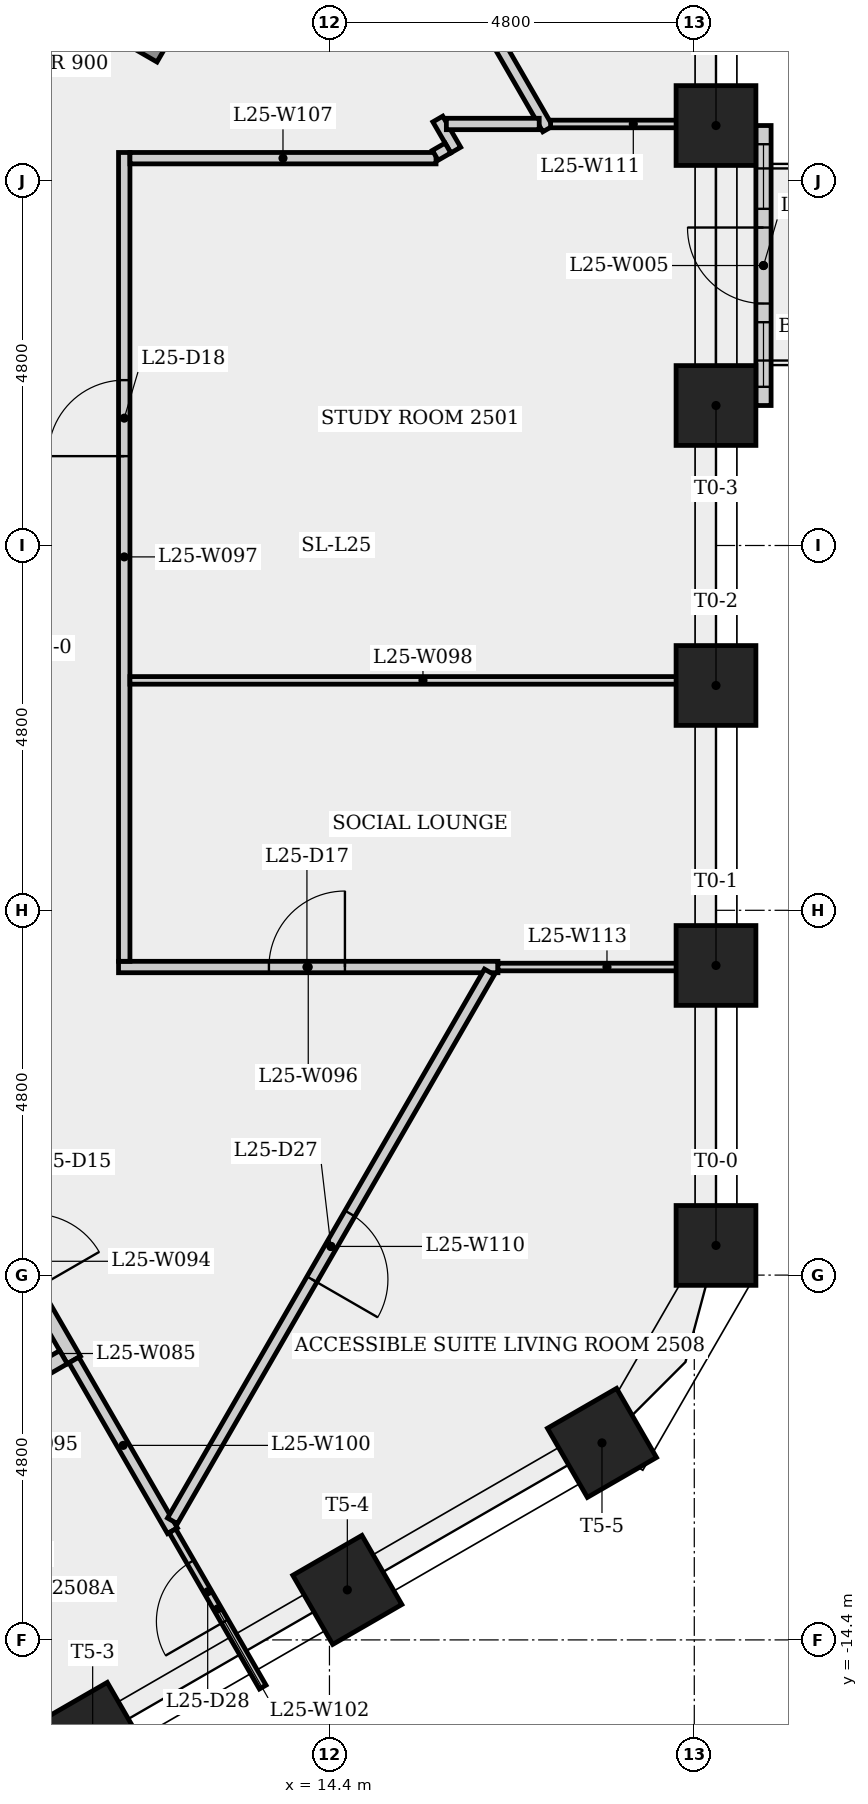
"""IFC4 building model, lengths in metres.
Left out: names, types, materials, properties, quantities, classifications, styles, units other than length and angle.
Written with IfcOpenShell. Run it as: python <this file> out.ifc"""

import sys

from ifc_helpers import new_model, si_unit, direction, frame, frame_2d, origin, origin_2d, place, context, subcontext, project, spatial, rectangle, extrude, element, fill, save


model = new_model("IFC4")
c1 = context("Model", 3, precision=1e-05, world=origin(), true_north=direction((0.0, 1.0)))
c2 = subcontext(c1, "Body", "Model", "MODEL_VIEW")
j1 = project(units=[si_unit("LENGTHUNIT", "METRE"), si_unit("PLANEANGLEUNIT", "RADIAN")], contexts=[c1])
p1 = place(None, origin())
s1 = spatial("IfcSite", under=j1, at=p1, CompositionType="ELEMENT")
p2 = place(p1, origin())
s2 = spatial("IfcBuilding", under=s1, at=p2, CompositionType="ELEMENT")
p3 = place(p2, frame((0.0, 0.0, 96.7)))
s3 = spatial("IfcBuildingStorey", under=s2, at=p3, CompositionType="ELEMENT", Elevation=96.7)
for number, where, z_axis, x_axis in (
    (1, (19.486, -9.209, 0.0), (0.0, 0.0, 1.0), (1.0, 0.0, 0.0)),
    (2, (19.486, -5.526, 0.0), (0.0, 0.0, 1.0), (1.0, 0.0, 0.0)),
    (3, (19.486, -1.842, 0.0), (0.0, 0.0, 1.0), (1.0, 0.0, 0.0)),
    (4, (19.486, 1.842, 0.0), (0.0, 0.0, 1.0), (1.0, 0.0, 0.0)),
    (5, (19.486, 5.526, 0.0), (0.0, 0.0, 1.0), (1.0, 0.0, 0.0)),
    (6, (11.284, -15.677, 0.0), (0.0, 0.0, 1.0), (0.5, -0.866, 0.0)),
    (7, (14.635, -13.742, 0.0), (0.0, 0.0, 1.0), (0.5, -0.866, 0.0)),
    (8, (17.986, -11.808, 0.0), (0.0, 0.0, 1.0), (0.5, -0.866, 0.0)),
):
    element("IfcColumn", number, at=place(p3, frame(where, z_axis=z_axis, x_axis=x_axis)), inside=s3, PredefinedType="COLUMN", context=c2, shape_type="SweptSolid", body=[
        extrude(rectangle(XDim=1.05, YDim=1.05, at=origin_2d()), origin(), (0.0, 0.0, 1.0), 3.4),
    ])
p4 = place(p3, frame((20.111, 1.842, 0.0), z_axis=(0.0, 0.0, 1.0), x_axis=(0.0, 1.0, 0.0)))
e9 = element("IfcWall", 9, at=p4, inside=s3, PredefinedType="SOLIDWALL", context=c2, shape_type="SweptSolid", body=[
    extrude(rectangle(XDim=3.684, YDim=0.2, at=frame_2d((1.842, 0.0))), origin(), (0.0, 0.0, 1.0), 3.4),
])
p5 = place(p4, frame((1.342, 0.0, 0.0)))
e10 = element("IfcOpeningElement", 10, at=p5, cuts=e9, PredefinedType="OPENING", context=c2, shape_type="SweptSolid", body=[
    extrude(rectangle(XDim=1.0, YDim=2.4, at=frame_2d((0.5, 1.2))), frame((0.0, 0.11, 0.0), z_axis=(0.0, -1.0, 0.0), x_axis=(1.0, 0.0, 0.0)), (0.0, 0.0, 1.0), 0.22),
])
p6 = place(p4, frame((0.246, 0.0, 0.9)))
e11 = element("IfcOpeningElement", 11, at=p6, cuts=e9, PredefinedType="OPENING", context=c2, shape_type="SweptSolid", body=[
    extrude(rectangle(XDim=0.85, YDim=1.5, at=frame_2d((0.425, 0.75))), frame((0.0, 0.11, 0.0), z_axis=(0.0, -1.0, 0.0), x_axis=(1.0, 0.0, 0.0)), (0.0, 0.0, 1.0), 0.22),
])
p7 = place(p4, frame((2.588, 0.0, 0.9)))
e12 = element("IfcOpeningElement", 12, at=p7, cuts=e9, PredefinedType="OPENING", context=c2, shape_type="SweptSolid", body=[
    extrude(rectangle(XDim=0.85, YDim=1.5, at=frame_2d((0.425, 0.75))), frame((0.0, 0.11, 0.0), z_axis=(0.0, -1.0, 0.0), x_axis=(1.0, 0.0, 0.0)), (0.0, 0.0, 1.0), 0.22),
])
p8 = place(p3, frame((9.537, -8.119, 0.0), z_axis=(0.0, 0.0, 1.0), x_axis=(0.499990139034, -0.866031096941, 0.0)))
e13 = element("IfcWall", 13, at=p8, inside=s3, PredefinedType="PARTITIONING", context=c2, shape_type="SweptSolid", body=[
    extrude(rectangle(XDim=3.0, YDim=0.2, at=frame_2d((1.5, 0.0))), origin(), (0.0, 0.0, 1.0), 3.05),
])
p9 = place(p8, frame((0.935, 0.0, 0.0)))
e14 = element("IfcOpeningElement", 14, at=p9, cuts=e13, PredefinedType="OPENING", context=c2, shape_type="SweptSolid", body=[
    extrude(rectangle(XDim=1.0, YDim=2.1, at=frame_2d((0.5, 1.05))), frame((0.0, 0.11, 0.0), z_axis=(0.0, -1.0, 0.0), x_axis=(1.0, 0.0, 0.0)), (0.0, 0.0, 1.0), 0.22),
])
p10 = place(p3, frame((10.901, -10.681, 0.0), z_axis=(0.0, 0.0, 1.0), x_axis=(-0.866007538022, -0.500030943131, 0.0)))
e15 = element("IfcWall", 15, at=p10, inside=s3, PredefinedType="PARTITIONING", context=c2, shape_type="SweptSolid", body=[
    extrude(rectangle(XDim=2.375, YDim=0.2, at=frame_2d((1.188, 0.0))), origin(), (0.0, 0.0, 1.0), 3.05),
])
p11 = place(p3, frame((11.625, -5.546, 0.0), z_axis=(0.0, 0.0, 1.0), x_axis=(1.0, 0.0, 0.0)))
e16 = element("IfcWall", 16, at=p11, inside=s3, PredefinedType="PARTITIONING", context=c2, shape_type="SweptSolid", body=[
    extrude(rectangle(XDim=4.992, YDim=0.15, at=frame_2d((2.496, 0.0))), origin(), (0.0, 0.0, 1.0), 3.05),
])
p12 = place(p11, frame((1.979, 0.0, 0.0)))
e17 = element("IfcOpeningElement", 17, at=p12, cuts=e16, PredefinedType="OPENING", context=c2, shape_type="SweptSolid", body=[
    extrude(rectangle(XDim=1.0, YDim=2.1, at=frame_2d((0.5, 1.05))), frame((0.0, 0.085, 0.0), z_axis=(0.0, -1.0, 0.0), x_axis=(1.0, 0.0, 0.0)), (0.0, 0.0, 1.0), 0.17),
])
p13 = place(p3, frame((11.7, -5.471, 0.0), z_axis=(0.0, 0.0, 1.0), x_axis=(0.0, 1.0, 0.0)))
e18 = element("IfcWall", 18, at=p13, inside=s3, PredefinedType="PARTITIONING", context=c2, shape_type="SweptSolid", body=[
    extrude(rectangle(XDim=10.643, YDim=0.15, at=frame_2d((5.321, 0.0))), origin(), (0.0, 0.0, 1.0), 3.05),
])
p14 = place(p13, frame((6.647, 0.0, 0.0)))
e19 = element("IfcOpeningElement", 19, at=p14, cuts=e18, PredefinedType="OPENING", context=c2, shape_type="SweptSolid", body=[
    extrude(rectangle(XDim=1.0, YDim=2.1, at=frame_2d((0.5, 1.05))), frame((0.0, 0.085, 0.0), z_axis=(0.0, -1.0, 0.0), x_axis=(1.0, 0.0, 0.0)), (0.0, 0.0, 1.0), 0.17),
])
p15 = place(p3, frame((11.775, -1.775, 0.0), z_axis=(0.0, 0.0, 1.0), x_axis=(1.0, 0.0, 0.0)))
e20 = element("IfcWall", 20, at=p15, inside=s3, PredefinedType="PARTITIONING", context=c2, shape_type="SweptSolid", body=[
    extrude(rectangle(XDim=7.711, YDim=0.1, at=frame_2d((3.855, 0.0))), origin(), (0.0, 0.0, 1.0), 3.05),
])
p16 = place(p3, frame((12.194, 6.47, 0.0), z_axis=(0.0, 0.0, 1.0), x_axis=(-0.866025499775, 0.499999833739, 0.0)))
e21 = element("IfcWall", 21, at=p16, inside=s3, PredefinedType="SHEAR", context=c2, shape_type="SweptSolid", body=[
    extrude(rectangle(XDim=6.4, YDim=0.25, at=frame_2d((3.2, 0.0))), origin(), (0.0, 0.0, 1.0), 3.05),
])
p17 = place(p16, frame((5.25, 0.0, 0.0)))
e22 = element("IfcOpeningElement", 22, at=p17, cuts=e21, PredefinedType="OPENING", context=c2, shape_type="SweptSolid", body=[
    extrude(rectangle(XDim=1.0, YDim=2.1, at=frame_2d((0.5, 1.05))), frame((0.0, 0.135, 0.0), z_axis=(0.0, -1.0, 0.0), x_axis=(1.0, 0.0, 0.0)), (0.0, 0.0, 1.0), 0.27),
])
p18 = place(p3, frame((12.334, -12.964, 0.0), z_axis=(0.0, 0.0, 1.0), x_axis=(-0.499974977939, 0.866039849796, 0.0)))
e23 = element("IfcWall", 23, at=p18, inside=s3, PredefinedType="PARTITIONING", context=c2, shape_type="SweptSolid", body=[
    extrude(rectangle(XDim=2.594, YDim=0.15, at=frame_2d((1.297, 0.0))), origin(), (0.0, 0.0, 1.0), 3.05),
])
p19 = place(p3, frame((13.522, -15.021, 0.0), z_axis=(0.0, 0.0, 1.0), x_axis=(-0.500030943131, 0.866007538022, 0.0)))
e24 = element("IfcWall", 24, at=p19, inside=s3, PredefinedType="PARTITIONING", context=c2, shape_type="SweptSolid", body=[
    extrude(rectangle(XDim=2.375, YDim=0.1, at=frame_2d((1.188, 0.0))), origin(), (0.0, 0.0, 1.0), 3.05),
])
p20 = place(p19, frame((0.998, 0.0, 0.0)))
e25 = element("IfcOpeningElement", 25, at=p20, cuts=e24, PredefinedType="OPENING", context=c2, shape_type="SweptSolid", body=[
    extrude(rectangle(XDim=0.9, YDim=2.1, at=frame_2d((0.45, 1.05))), frame((0.0, 0.06, 0.0), z_axis=(0.0, -1.0, 0.0), x_axis=(1.0, 0.0, 0.0)), (0.0, 0.0, 1.0), 0.12),
])
p21 = place(p3, frame((14.413, 10.434, 0.0), z_axis=(0.0, 0.0, 1.0), x_axis=(0.49999591573, -0.866027761826, 0.0)))
e26 = element("IfcWall", 26, at=p21, inside=s3, PredefinedType="PARTITIONING", context=c2, shape_type="SweptSolid", body=[
    extrude(rectangle(XDim=5.719, YDim=0.15, at=frame_2d((2.859, 0.0))), origin(), (0.0, 0.0, 1.0), 3.05),
])
p22 = place(p21, frame((2.304, 0.0, 0.0)))
e27 = element("IfcOpeningElement", 27, at=p22, cuts=e26, PredefinedType="OPENING", context=c2, shape_type="SweptSolid", body=[
    extrude(rectangle(XDim=1.0, YDim=2.1, at=frame_2d((0.5, 1.05))), frame((0.0, 0.085, 0.0), z_axis=(0.0, -1.0, 0.0), x_axis=(1.0, 0.0, 0.0)), (0.0, 0.0, 1.0), 0.17),
])
p23 = place(p3, frame((15.802, 5.096, 0.0), z_axis=(0.0, 0.0, 1.0), x_axis=(-1.0, 0.0, 0.0)))
e28 = element("IfcWall", 28, at=p23, inside=s3, PredefinedType="PARTITIONING", context=c2, shape_type="SweptSolid", body=[
    extrude(rectangle(XDim=4.027, YDim=0.15, at=frame_2d((2.014, 0.0))), origin(), (0.0, 0.0, 1.0), 3.05),
])
p24 = place(p3, frame((15.826, 5.611, 0.0), z_axis=(0.0, 0.0, 1.0), x_axis=(0.499647745683, -0.866228682412, 0.0)))
e29 = element("IfcWall", 29, at=p24, inside=s3, PredefinedType="PARTITIONING", context=c2, shape_type="SweptSolid", body=[
    extrude(rectangle(XDim=0.471, YDim=0.15, at=frame_2d((0.236, 0.0))), origin(), (0.0, 0.0, 1.0), 3.05),
])
p25 = place(p3, frame((15.959, 5.23, 0.0), z_axis=(0.0, 0.0, 1.0), x_axis=(-0.865974735705, -0.50008774942, 0.0)))
e30 = element("IfcWall", 30, at=p25, inside=s3, PredefinedType="PARTITIONING", context=c2, shape_type="SweptSolid", body=[
    extrude(rectangle(XDim=0.193, YDim=0.15, at=frame_2d((0.096, 0.0))), origin(), (0.0, 0.0, 1.0), 3.05),
])
p26 = place(p3, frame((16.504, -5.611, 0.0), z_axis=(0.0, 0.0, 1.0), x_axis=(-0.499992746786, -0.866029591389, 0.0)))
e31 = element("IfcWall", 31, at=p26, inside=s3, PredefinedType="PARTITIONING", context=c2, shape_type="SweptSolid", body=[
    extrude(rectangle(XDim=8.34, YDim=0.15, at=frame_2d((4.17, 0.0))), origin(), (0.0, 0.0, 1.0), 3.05),
])
p27 = place(p26, frame((3.67, 0.0, 0.0)))
e32 = element("IfcOpeningElement", 32, at=p27, cuts=e31, PredefinedType="OPENING", context=c2, shape_type="SweptSolid", body=[
    extrude(rectangle(XDim=1.0, YDim=2.1, at=frame_2d((0.5, 1.05))), frame((0.0, 0.085, 0.0), z_axis=(0.0, -1.0, 0.0), x_axis=(1.0, 0.0, 0.0)), (0.0, 0.0, 1.0), 0.17),
])
p28 = place(p3, frame((17.31, 5.546, 0.0), z_axis=(0.0, 0.0, 1.0), x_axis=(1.0, 0.0, 0.0)))
e33 = element("IfcWall", 33, at=p28, inside=s3, PredefinedType="PARTITIONING", context=c2, shape_type="SweptSolid", body=[
    extrude(rectangle(XDim=2.176, YDim=0.1, at=frame_2d((1.088, 0.0))), origin(), (0.0, 0.0, 1.0), 3.05),
])
p29 = place(p3, frame((17.16, 5.546, 0.0), z_axis=(0.0, 0.0, 1.0), x_axis=(-1.0, 0.0, 0.0)))
e34 = element("IfcWall", 34, at=p29, inside=s3, PredefinedType="PARTITIONING", context=c2, shape_type="SweptSolid", body=[
    extrude(rectangle(XDim=1.222, YDim=0.15, at=frame_2d((0.611, 0.0))), origin(), (0.0, 0.0, 1.0), 3.05),
])
p30 = place(p3, frame((19.486, -5.546, 0.0), z_axis=(0.0, 0.0, 1.0), x_axis=(-1.0, 0.0, 0.0)))
e35 = element("IfcWall", 35, at=p30, inside=s3, PredefinedType="PARTITIONING", context=c2, shape_type="SweptSolid", body=[
    extrude(rectangle(XDim=2.869, YDim=0.1, at=frame_2d((1.434, 0.0))), origin(), (0.0, 0.0, 1.0), 3.05),
])
p31 = place(p5, origin())
e36 = element("IfcDoor", 36, at=p31, inside=s3, OperationType="SINGLE_SWING_RIGHT", PredefinedType="DOOR", context=c2, shape_type="SweptSolid", body=[
    extrude(rectangle(XDim=1.0, YDim=2.4, at=frame_2d((0.5, 1.2))), frame((0.0, 0.025, 0.0), z_axis=(0.0, -1.0, 0.0), x_axis=(1.0, 0.0, 0.0)), (0.0, 0.0, 1.0), 0.05),
])
fill(e10, e36)
p32 = place(p6, origin())
e37 = element("IfcWindow", 37, at=p32, inside=s3, PartitioningType="SINGLE_PANEL", PredefinedType="WINDOW", context=c2, shape_type="SweptSolid", body=[
    extrude(rectangle(XDim=0.85, YDim=1.5, at=frame_2d((0.425, 0.75))), frame((0.0, 0.03, 0.0), z_axis=(0.0, -1.0, 0.0), x_axis=(1.0, 0.0, 0.0)), (0.0, 0.0, 1.0), 0.06),
])
fill(e11, e37)
p33 = place(p7, origin())
e38 = element("IfcWindow", 38, at=p33, inside=s3, PartitioningType="SINGLE_PANEL", PredefinedType="WINDOW", context=c2, shape_type="SweptSolid", body=[
    extrude(rectangle(XDim=0.85, YDim=1.5, at=frame_2d((0.425, 0.75))), frame((0.0, 0.03, 0.0), z_axis=(0.0, -1.0, 0.0), x_axis=(1.0, 0.0, 0.0)), (0.0, 0.0, 1.0), 0.06),
])
fill(e12, e38)
p34 = place(p12, origin())
e39 = element("IfcDoor", 39, at=p34, inside=s3, OperationType="SINGLE_SWING_RIGHT", PredefinedType="DOOR", context=c2, shape_type="SweptSolid", body=[
    extrude(rectangle(XDim=1.0, YDim=2.1, at=frame_2d((0.5, 1.05))), frame((0.0, 0.025, 0.0), z_axis=(0.0, -1.0, 0.0), x_axis=(1.0, 0.0, 0.0)), (0.0, 0.0, 1.0), 0.05),
])
fill(e17, e39)
p35 = place(p14, origin())
e40 = element("IfcDoor", 40, at=p35, inside=s3, OperationType="SINGLE_SWING_LEFT", PredefinedType="DOOR", context=c2, shape_type="SweptSolid", body=[
    extrude(rectangle(XDim=1.0, YDim=2.1, at=frame_2d((0.5, 1.05))), frame((0.0, 0.025, 0.0), z_axis=(0.0, -1.0, 0.0), x_axis=(1.0, 0.0, 0.0)), (0.0, 0.0, 1.0), 0.05),
])
fill(e19, e40)
p36 = place(p27, origin())
e41 = element("IfcDoor", 41, at=p36, inside=s3, OperationType="SINGLE_SWING_RIGHT", PredefinedType="DOOR", context=c2, shape_type="SweptSolid", body=[
    extrude(rectangle(XDim=1.0, YDim=2.1, at=frame_2d((0.5, 1.05))), frame((0.0, 0.025, 0.0), z_axis=(0.0, -1.0, 0.0), x_axis=(1.0, 0.0, 0.0)), (0.0, 0.0, 1.0), 0.05),
])
fill(e32, e41)
p37 = place(p20, origin())
e42 = element("IfcDoor", 42, at=p37, inside=s3, OperationType="SINGLE_SWING_LEFT", PredefinedType="DOOR", context=c2, shape_type="SweptSolid", body=[
    extrude(rectangle(XDim=0.9, YDim=2.1, at=frame_2d((0.45, 1.05))), frame((0.0, 0.025, 0.0), z_axis=(0.0, -1.0, 0.0), x_axis=(1.0, 0.0, 0.0)), (0.0, 0.0, 1.0), 0.05),
])
fill(e25, e42)
save(model, sys.argv[1])
